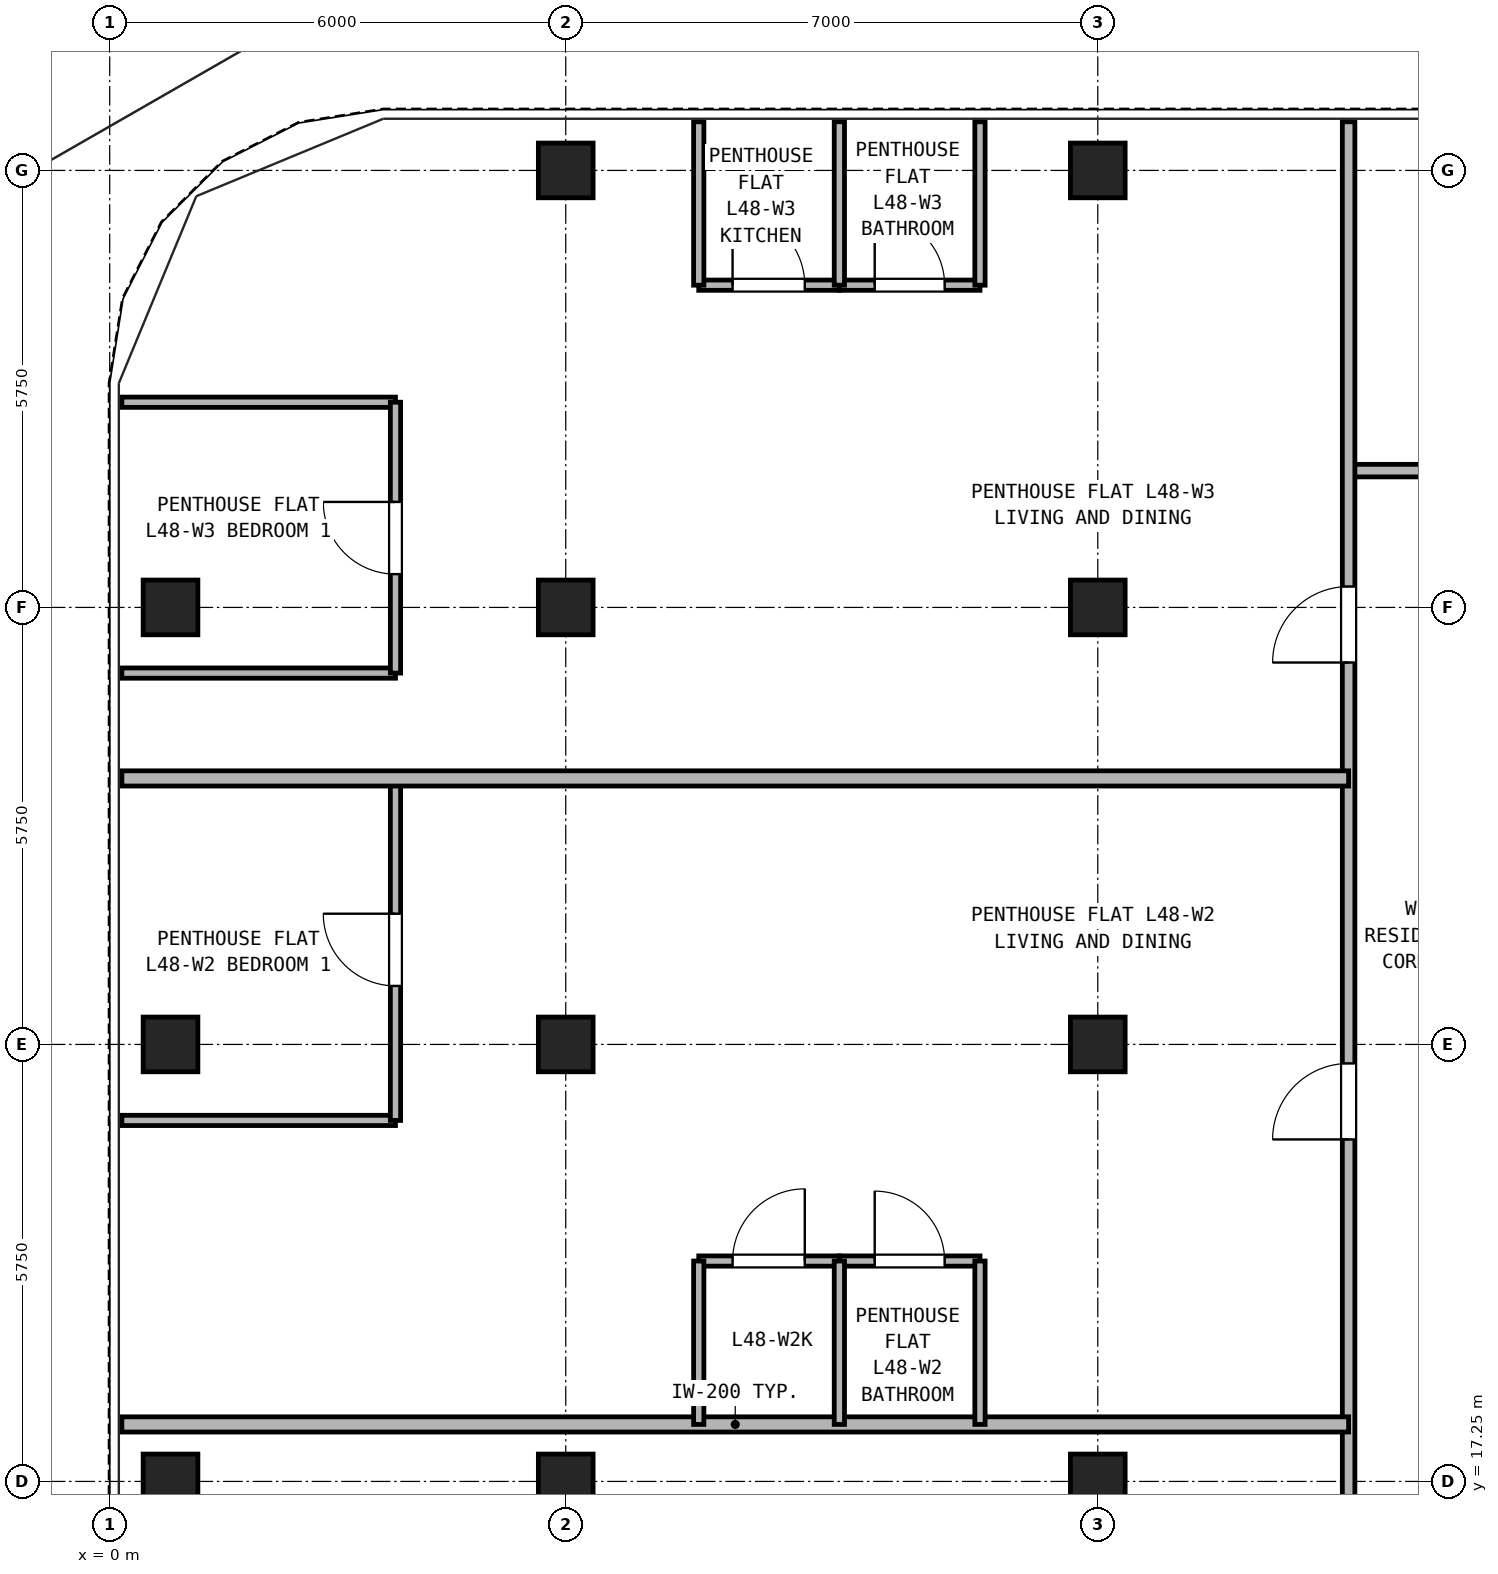
"""IFC4 building model, lengths in metres.
Left out: names, types, materials, properties, quantities, classifications, styles, units other than length and angle.
Written with IfcOpenShell. Run it as: python <this file> out.ifc"""

import sys

from ifc_helpers import new_model, si_unit, direction, frame, frame_2d, origin, origin_2d, place, context, subcontext, project, spatial, rectangle, hollow_rectangle, extrude, source, transform, mapped, element, fill, save


model = new_model("IFC4")
c1 = context("Model", 3, precision=1e-05, world=origin(), true_north=direction((0.0, 1.0)))
c2 = subcontext(c1, "Body", "Model", "MODEL_VIEW")
j1 = project(units=[si_unit("LENGTHUNIT", "METRE"), si_unit("PLANEANGLEUNIT", "RADIAN")], contexts=[c1])
p1 = place(None, origin())
s1 = spatial("IfcSite", under=j1, at=p1, CompositionType="ELEMENT")
p2 = place(p1, origin())
s2 = spatial("IfcBuilding", under=s1, at=p2, CompositionType="ELEMENT")
p3 = place(p2, frame((0.0, 0.0, 172.1)))
s3 = spatial("IfcBuildingStorey", under=s2, at=p3, CompositionType="ELEMENT", Elevation=172.1)
m1 = source(origin(), c2, "Body", "SweptSolid", [
    extrude(hollow_rectangle(XDim=0.72, YDim=0.72, WallThickness=0.04, at=origin_2d()), origin(), (0.0, 0.0, 1.0), 2.95),
])
for number, where, z_axis, x_axis in (
    (1, (6.0, 34.5, 0.0), (0.0, 0.0, 1.0), (1.0, 0.0, 0.0)),
    (2, (13.0, 34.5, 0.0), (0.0, 0.0, 1.0), (1.0, 0.0, 0.0)),
    (3, (0.8, 17.25, 0.0), (0.0, 0.0, 1.0), (1.0, 0.0, 0.0)),
    (4, (0.8, 23.0, 0.0), (0.0, 0.0, 1.0), (1.0, 0.0, 0.0)),
    (5, (0.8, 28.75, 0.0), (0.0, 0.0, 1.0), (1.0, 0.0, 0.0)),
    (6, (6.0, 17.25, 0.0), (0.0, 0.0, 1.0), (1.0, 0.0, 0.0)),
    (7, (6.0, 23.0, 0.0), (0.0, 0.0, 1.0), (1.0, 0.0, 0.0)),
    (8, (6.0, 28.75, 0.0), (0.0, 0.0, 1.0), (1.0, 0.0, 0.0)),
    (9, (13.0, 17.25, 0.0), (0.0, 0.0, 1.0), (1.0, 0.0, 0.0)),
    (10, (13.0, 23.0, 0.0), (0.0, 0.0, 1.0), (1.0, 0.0, 0.0)),
    (11, (13.0, 28.75, 0.0), (0.0, 0.0, 1.0), (1.0, 0.0, 0.0)),
):
    element("IfcColumn", number, at=place(p3, frame(where, z_axis=z_axis, x_axis=x_axis)), inside=s3, PredefinedType="COLUMN", context=c2, shape_type="MappedRepresentation", body=[
        mapped(m1, transform((0.0, 0.0, 0.0), x_axis=(1.0, 0.0, 0.0), y_axis=(0.0, 1.0, 0.0), z_axis=(0.0, 0.0, 1.0), scale=1.0)),
    ])
p4 = place(p3, frame((16.3, 30.55, 0.0), z_axis=(0.0, 0.0, 1.0), x_axis=(1.0, 0.0, 0.0)))
e12 = element("IfcWall", 12, at=p4, inside=s3, PredefinedType="PARTITIONING", context=c2, shape_type="SweptSolid", body=[
    extrude(rectangle(XDim=14.4, YDim=0.165, at=frame_2d((7.2, 0.0))), origin(), (0.0, 0.0, 1.0), 2.95),
])
p5 = place(p4, frame((2.1, 0.0, 0.0)))
e13 = element("IfcOpeningElement", 13, at=p5, cuts=e12, PredefinedType="OPENING", context=c2, shape_type="SweptSolid", body=[
    extrude(rectangle(XDim=0.95, YDim=2.15, at=frame_2d((0.475, 1.075))), frame((0.0, 0.093, 0.0), z_axis=(0.0, -1.0, 0.0), x_axis=(1.0, 0.0, 0.0)), (0.0, 0.0, 1.0), 0.185),
])
p6 = place(p4, frame((6.9, 0.0, 0.0)))
e14 = element("IfcOpeningElement", 14, at=p6, cuts=e12, PredefinedType="OPENING", context=c2, shape_type="SweptSolid", body=[
    extrude(rectangle(XDim=0.95, YDim=2.15, at=frame_2d((0.475, 1.075))), frame((0.0, 0.093, 0.0), z_axis=(0.0, -1.0, 0.0), x_axis=(1.0, 0.0, 0.0)), (0.0, 0.0, 1.0), 0.185),
])
p7 = place(p4, frame((11.5, 0.0, 0.0)))
e15 = element("IfcOpeningElement", 15, at=p7, cuts=e12, PredefinedType="OPENING", context=c2, shape_type="SweptSolid", body=[
    extrude(rectangle(XDim=0.92, YDim=2.1, at=frame_2d((0.46, 1.05))), frame((0.0, 0.093, 0.0), z_axis=(0.0, -1.0, 0.0), x_axis=(1.0, 0.0, 0.0)), (0.0, 0.0, 1.0), 0.185),
])
p8 = place(p3, frame((16.3, 11.45, 0.0), z_axis=(0.0, 0.0, 1.0), x_axis=(0.0, 1.0, 0.0)))
e16 = element("IfcWall", 16, at=p8, inside=s3, PredefinedType="PARTITIONING", context=c2, shape_type="SweptSolid", body=[
    extrude(rectangle(XDim=23.69, YDim=0.165, at=frame_2d((11.845, 0.0))), origin(), (0.0, 0.0, 1.0), 2.95),
])
p9 = place(p8, frame((2.775, 0.0, 0.0)))
e17 = element("IfcOpeningElement", 17, at=p9, cuts=e16, PredefinedType="OPENING", context=c2, shape_type="SweptSolid", body=[
    extrude(rectangle(XDim=1.0, YDim=2.15, at=frame_2d((0.5, 1.075))), frame((0.0, 0.093, 0.0), z_axis=(0.0, -1.0, 0.0), x_axis=(1.0, 0.0, 0.0)), (0.0, 0.0, 1.0), 0.185),
])
p10 = place(p8, frame((10.3, 0.0, 0.0)))
e18 = element("IfcOpeningElement", 18, at=p10, cuts=e16, PredefinedType="OPENING", context=c2, shape_type="SweptSolid", body=[
    extrude(rectangle(XDim=1.0, YDim=2.15, at=frame_2d((0.5, 1.075))), frame((0.0, 0.093, 0.0), z_axis=(0.0, -1.0, 0.0), x_axis=(1.0, 0.0, 0.0)), (0.0, 0.0, 1.0), 0.185),
])
p11 = place(p8, frame((16.575, 0.0, 0.0)))
e19 = element("IfcOpeningElement", 19, at=p11, cuts=e16, PredefinedType="OPENING", context=c2, shape_type="SweptSolid", body=[
    extrude(rectangle(XDim=1.0, YDim=2.15, at=frame_2d((0.5, 1.075))), frame((0.0, 0.093, 0.0), z_axis=(0.0, -1.0, 0.0), x_axis=(1.0, 0.0, 0.0)), (0.0, 0.0, 1.0), 0.185),
])
p12 = place(p3, frame((0.16, 18.0, 0.0), z_axis=(0.0, 0.0, 1.0), x_axis=(1.0, 0.0, 0.0)))
e20 = element("IfcWall", 20, at=p12, inside=s3, PredefinedType="PARTITIONING", context=c2, shape_type="SweptSolid", body=[
    extrude(rectangle(XDim=16.14, YDim=0.2, at=frame_2d((8.07, 0.0))), origin(), (0.0, 0.0, 1.0), 2.95),
])
p13 = place(p3, frame((7.75, 20.15, 0.0), z_axis=(0.0, 0.0, 1.0), x_axis=(1.0, 0.0, 0.0)))
e21 = element("IfcWall", 21, at=p13, inside=s3, PredefinedType="PARTITIONING", context=c2, shape_type="SweptSolid", body=[
    extrude(rectangle(XDim=1.85, YDim=0.135, at=frame_2d((0.925, 0.0))), origin(), (0.0, 0.0, 1.0), 2.583),
])
p14 = place(p13, frame((0.445, 0.0, 0.0)))
e22 = element("IfcOpeningElement", 22, at=p14, cuts=e21, PredefinedType="OPENING", context=c2, shape_type="SweptSolid", body=[
    extrude(rectangle(XDim=0.95, YDim=2.15, at=frame_2d((0.475, 1.075))), frame((0.0, 0.077, 0.0), z_axis=(0.0, -1.0, 0.0), x_axis=(1.0, 0.0, 0.0)), (0.0, 0.0, 1.0), 0.155),
])
p15 = place(p3, frame((9.6, 20.15, 0.0), z_axis=(0.0, 0.0, 1.0), x_axis=(1.0, 0.0, 0.0)))
e23 = element("IfcWall", 23, at=p15, inside=s3, PredefinedType="PARTITIONING", context=c2, shape_type="SweptSolid", body=[
    extrude(rectangle(XDim=1.85, YDim=0.135, at=frame_2d((0.925, 0.0))), origin(), (0.0, 0.0, 1.0), 2.583),
])
p16 = place(p15, frame((0.465, 0.0, 0.0)))
e24 = element("IfcOpeningElement", 24, at=p16, cuts=e23, PredefinedType="OPENING", context=c2, shape_type="SweptSolid", body=[
    extrude(rectangle(XDim=0.92, YDim=2.1, at=frame_2d((0.46, 1.05))), frame((0.0, 0.077, 0.0), z_axis=(0.0, -1.0, 0.0), x_axis=(1.0, 0.0, 0.0)), (0.0, 0.0, 1.0), 0.155),
])
for number, where, z_axis, x_axis in (
    (25, (7.75, 18.0, 0.0), (0.0, 0.0, 1.0), (0.0, 1.0, 0.0)),
    (26, (9.6, 18.0, 0.0), (0.0, 0.0, 1.0), (0.0, 1.0, 0.0)),
    (27, (11.45, 18.0, 0.0), (0.0, 0.0, 1.0), (0.0, 1.0, 0.0)),
):
    element("IfcWall", number, at=place(p3, frame(where, z_axis=z_axis, x_axis=x_axis)), inside=s3, PredefinedType="PARTITIONING", context=c2, shape_type="SweptSolid", body=[
        extrude(rectangle(XDim=2.15, YDim=0.135, at=frame_2d((1.075, 0.0))), origin(), (0.0, 0.0, 1.0), 2.95),
    ])
p17 = place(p3, frame((0.16, 22.0, 0.0), z_axis=(0.0, 0.0, 1.0), x_axis=(1.0, 0.0, 0.0)))
e28 = element("IfcWall", 28, at=p17, inside=s3, PredefinedType="PARTITIONING", context=c2, shape_type="SweptSolid", body=[
    extrude(rectangle(XDim=3.6, YDim=0.135, at=frame_2d((1.8, 0.0))), origin(), (0.0, 0.0, 1.0), 2.95),
])
p18 = place(p3, frame((3.76, 22.0, 0.0), z_axis=(0.0, 0.0, 1.0), x_axis=(0.0, 1.0, 0.0)))
e29 = element("IfcWall", 29, at=p18, inside=s3, PredefinedType="PARTITIONING", context=c2, shape_type="SweptSolid", body=[
    extrude(rectangle(XDim=4.5, YDim=0.135, at=frame_2d((2.25, 0.0))), origin(), (0.0, 0.0, 1.0), 2.95),
])
p19 = place(p18, frame((1.77, 0.0, 0.0)))
e30 = element("IfcOpeningElement", 30, at=p19, cuts=e29, PredefinedType="OPENING", context=c2, shape_type="SweptSolid", body=[
    extrude(rectangle(XDim=0.95, YDim=2.15, at=frame_2d((0.475, 1.075))), frame((0.0, 0.077, 0.0), z_axis=(0.0, -1.0, 0.0), x_axis=(1.0, 0.0, 0.0)), (0.0, 0.0, 1.0), 0.155),
])
p20 = place(p3, frame((0.16, 26.5, 0.0), z_axis=(0.0, 0.0, 1.0), x_axis=(1.0, 0.0, 0.0)))
e31 = element("IfcWall", 31, at=p20, inside=s3, PredefinedType="PARTITIONING", context=c2, shape_type="SweptSolid", body=[
    extrude(rectangle(XDim=16.14, YDim=0.2, at=frame_2d((8.07, 0.0))), origin(), (0.0, 0.0, 1.0), 2.95),
])
p21 = place(p3, frame((7.75, 32.99, 0.0), z_axis=(0.0, 0.0, 1.0), x_axis=(1.0, 0.0, 0.0)))
e32 = element("IfcWall", 32, at=p21, inside=s3, PredefinedType="PARTITIONING", context=c2, shape_type="SweptSolid", body=[
    extrude(rectangle(XDim=1.85, YDim=0.135, at=frame_2d((0.925, 0.0))), origin(), (0.0, 0.0, 1.0), 2.95),
])
p22 = place(p21, frame((0.445, 0.0, 0.0)))
e33 = element("IfcOpeningElement", 33, at=p22, cuts=e32, PredefinedType="OPENING", context=c2, shape_type="SweptSolid", body=[
    extrude(rectangle(XDim=0.95, YDim=2.15, at=frame_2d((0.475, 1.075))), frame((0.0, 0.077, 0.0), z_axis=(0.0, -1.0, 0.0), x_axis=(1.0, 0.0, 0.0)), (0.0, 0.0, 1.0), 0.155),
])
p23 = place(p3, frame((9.6, 32.99, 0.0), z_axis=(0.0, 0.0, 1.0), x_axis=(1.0, 0.0, 0.0)))
e34 = element("IfcWall", 34, at=p23, inside=s3, PredefinedType="PARTITIONING", context=c2, shape_type="SweptSolid", body=[
    extrude(rectangle(XDim=1.85, YDim=0.135, at=frame_2d((0.925, 0.0))), origin(), (0.0, 0.0, 1.0), 2.95),
])
p24 = place(p23, frame((0.465, 0.0, 0.0)))
e35 = element("IfcOpeningElement", 35, at=p24, cuts=e34, PredefinedType="OPENING", context=c2, shape_type="SweptSolid", body=[
    extrude(rectangle(XDim=0.92, YDim=2.1, at=frame_2d((0.46, 1.05))), frame((0.0, 0.077, 0.0), z_axis=(0.0, -1.0, 0.0), x_axis=(1.0, 0.0, 0.0)), (0.0, 0.0, 1.0), 0.155),
])
for number, where, z_axis, x_axis in (
    (36, (7.75, 32.99, 0.0), (0.0, 0.0, 1.0), (0.0, 1.0, 0.0)),
    (37, (9.6, 32.99, 0.0), (0.0, 0.0, 1.0), (0.0, 1.0, 0.0)),
    (38, (11.45, 32.99, 0.0), (0.0, 0.0, 1.0), (0.0, 1.0, 0.0)),
):
    element("IfcWall", number, at=place(p3, frame(where, z_axis=z_axis, x_axis=x_axis)), inside=s3, PredefinedType="PARTITIONING", context=c2, shape_type="SweptSolid", body=[
        extrude(rectangle(XDim=2.15, YDim=0.135, at=frame_2d((1.075, 0.0))), origin(), (0.0, 0.0, 1.0), 2.95),
    ])
for number, where, z_axis, x_axis in (
    (39, (0.16, 27.886, 0.0), (0.0, 0.0, 1.0), (1.0, 0.0, 0.0)),
    (40, (0.16, 31.45, 0.0), (0.0, 0.0, 1.0), (1.0, 0.0, 0.0)),
):
    element("IfcWall", number, at=place(p3, frame(where, z_axis=z_axis, x_axis=x_axis)), inside=s3, PredefinedType="PARTITIONING", context=c2, shape_type="SweptSolid", body=[
        extrude(rectangle(XDim=3.6, YDim=0.135, at=frame_2d((1.8, 0.0))), origin(), (0.0, 0.0, 1.0), 2.95),
    ])
p25 = place(p3, frame((3.76, 27.886, 0.0), z_axis=(0.0, 0.0, 1.0), x_axis=(0.0, 1.0, 0.0)))
e41 = element("IfcWall", 41, at=p25, inside=s3, PredefinedType="PARTITIONING", context=c2, shape_type="SweptSolid", body=[
    extrude(rectangle(XDim=3.564, YDim=0.135, at=frame_2d((1.782, 0.0))), origin(), (0.0, 0.0, 1.0), 2.95),
])
p26 = place(p25, frame((1.302, 0.0, 0.0)))
e42 = element("IfcOpeningElement", 42, at=p26, cuts=e41, PredefinedType="OPENING", context=c2, shape_type="SweptSolid", body=[
    extrude(rectangle(XDim=0.95, YDim=2.15, at=frame_2d((0.475, 1.075))), frame((0.0, 0.077, 0.0), z_axis=(0.0, -1.0, 0.0), x_axis=(1.0, 0.0, 0.0)), (0.0, 0.0, 1.0), 0.155),
])
p27 = place(p14, origin())
e43 = element("IfcDoor", 43, at=p27, inside=s3, OperationType="SINGLE_SWING_RIGHT", PredefinedType="DOOR", context=c2, shape_type="SweptSolid", body=[
    extrude(rectangle(XDim=0.95, YDim=2.15, at=frame_2d((0.475, 1.075))), frame((0.0, 0.025, 0.0), z_axis=(0.0, -1.0, 0.0), x_axis=(1.0, 0.0, 0.0)), (0.0, 0.0, 1.0), 0.05),
])
fill(e22, e43)
p28 = place(p16, origin())
e44 = element("IfcDoor", 44, at=p28, inside=s3, OperationType="SINGLE_SWING_LEFT", PredefinedType="DOOR", context=c2, shape_type="SweptSolid", body=[
    extrude(rectangle(XDim=0.92, YDim=2.1, at=frame_2d((0.46, 1.05))), frame((0.0, 0.025, 0.0), z_axis=(0.0, -1.0, 0.0), x_axis=(1.0, 0.0, 0.0)), (0.0, 0.0, 1.0), 0.05),
])
fill(e24, e44)
p29 = place(p19, origin())
e45 = element("IfcDoor", 45, at=p29, inside=s3, OperationType="SINGLE_SWING_RIGHT", PredefinedType="DOOR", context=c2, shape_type="SweptSolid", body=[
    extrude(rectangle(XDim=0.95, YDim=2.15, at=frame_2d((0.475, 1.075))), frame((0.0, 0.025, 0.0), z_axis=(0.0, -1.0, 0.0), x_axis=(1.0, 0.0, 0.0)), (0.0, 0.0, 1.0), 0.05),
])
fill(e30, e45)
p30 = place(p10, origin())
e46 = element("IfcDoor", 46, at=p30, inside=s3, OperationType="SINGLE_SWING_LEFT", PredefinedType="DOOR", context=c2, shape_type="SweptSolid", body=[
    extrude(rectangle(XDim=1.0, YDim=2.15, at=frame_2d((0.5, 1.075))), frame((0.0, 0.025, 0.0), z_axis=(0.0, -1.0, 0.0), x_axis=(1.0, 0.0, 0.0)), (0.0, 0.0, 1.0), 0.05),
])
fill(e18, e46)
p31 = place(p22, frame((0.95, 0.0, 0.0), z_axis=(0.0, 0.0, 1.0), x_axis=(-1.0, 0.0, 0.0)))
e47 = element("IfcDoor", 47, at=p31, inside=s3, OperationType="SINGLE_SWING_LEFT", PredefinedType="DOOR", context=c2, shape_type="SweptSolid", body=[
    extrude(rectangle(XDim=0.95, YDim=2.15, at=frame_2d((0.475, 1.075))), frame((0.0, 0.025, 0.0), z_axis=(0.0, -1.0, 0.0), x_axis=(1.0, 0.0, 0.0)), (0.0, 0.0, 1.0), 0.05),
])
fill(e33, e47)
p32 = place(p24, frame((0.92, 0.0, 0.0), z_axis=(0.0, 0.0, 1.0), x_axis=(-1.0, 0.0, 0.0)))
e48 = element("IfcDoor", 48, at=p32, inside=s3, OperationType="SINGLE_SWING_LEFT", PredefinedType="DOOR", context=c2, shape_type="SweptSolid", body=[
    extrude(rectangle(XDim=0.92, YDim=2.1, at=frame_2d((0.46, 1.05))), frame((0.0, 0.025, 0.0), z_axis=(0.0, -1.0, 0.0), x_axis=(1.0, 0.0, 0.0)), (0.0, 0.0, 1.0), 0.05),
])
fill(e35, e48)
p33 = place(p26, origin())
e49 = element("IfcDoor", 49, at=p33, inside=s3, OperationType="SINGLE_SWING_RIGHT", PredefinedType="DOOR", context=c2, shape_type="SweptSolid", body=[
    extrude(rectangle(XDim=0.95, YDim=2.15, at=frame_2d((0.475, 1.075))), frame((0.0, 0.025, 0.0), z_axis=(0.0, -1.0, 0.0), x_axis=(1.0, 0.0, 0.0)), (0.0, 0.0, 1.0), 0.05),
])
fill(e42, e49)
p34 = place(p11, origin())
e50 = element("IfcDoor", 50, at=p34, inside=s3, OperationType="SINGLE_SWING_LEFT", PredefinedType="DOOR", context=c2, shape_type="SweptSolid", body=[
    extrude(rectangle(XDim=1.0, YDim=2.15, at=frame_2d((0.5, 1.075))), frame((0.0, 0.025, 0.0), z_axis=(0.0, -1.0, 0.0), x_axis=(1.0, 0.0, 0.0)), (0.0, 0.0, 1.0), 0.05),
])
fill(e19, e50)
save(model, sys.argv[1])
